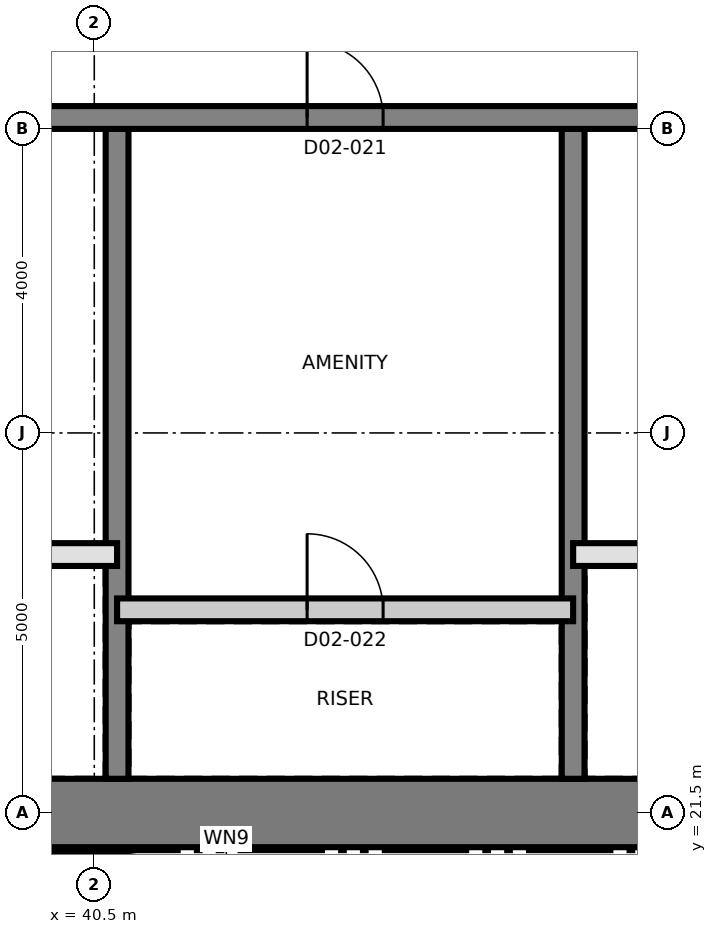
"""IFC4 building model, lengths in metres.
Left out: names, types, materials, properties, quantities, classifications, styles, units other than length and angle.
Written with IfcOpenShell. Run it as: python <this file> out.ifc"""

import sys

from ifc_helpers import new_model, si_unit, direction, frame, frame_2d, origin, place, context, subcontext, project, spatial, rectangle, extrude, element, fill, save


model = new_model("IFC4")
c1 = context("Model", 3, precision=1e-05, world=origin(), true_north=direction((0.0, 1.0)))
c2 = subcontext(c1, "Body", "Model", "MODEL_VIEW")
j1 = project(units=[si_unit("LENGTHUNIT", "METRE"), si_unit("PLANEANGLEUNIT", "RADIAN")], contexts=[c1])
p1 = place(None, origin())
s1 = spatial("IfcSite", under=j1, at=p1, CompositionType="ELEMENT")
p2 = place(p1, origin())
s2 = spatial("IfcBuilding", under=s1, at=p2, CompositionType="ELEMENT")
p3 = place(p2, frame((0.0, 0.0, 48.3)))
s3 = spatial("IfcBuildingStorey", under=s2, at=p3, CompositionType="ELEMENT", Elevation=48.3)
p4 = place(p3, frame((31.05, 21.5, 0.0), z_axis=(0.0, 0.0, 1.0), x_axis=(1.0, 0.0, 0.0)))
e1 = element("IfcWall", 1, at=p4, inside=s3, PredefinedType="SHEAR", context=c2, shape_type="SweptSolid", body=[
    extrude(rectangle(XDim=27.0, YDim=0.9, at=frame_2d((13.5, 0.0))), origin(), (0.0, 0.0, 1.0), 3.7),
])
for number, where, z_axis, x_axis in (
    (2, (40.8, 21.95, 0.0), (0.0, 0.0, 1.0), (0.0, 1.0, 0.0)),
    (3, (46.8, 21.95, 0.0), (0.0, 0.0, 1.0), (0.0, 1.0, 0.0)),
):
    element("IfcWall", number, at=place(p3, frame(where, z_axis=z_axis, x_axis=x_axis)), inside=s3, PredefinedType="SHEAR", context=c2, shape_type="SweptSolid", body=[
        extrude(rectangle(XDim=8.55, YDim=0.3, at=frame_2d((4.275, 0.0))), origin(), (0.0, 0.0, 1.0), 3.7),
    ])
p5 = place(p3, frame((31.95, 30.65, 0.0), z_axis=(0.0, 0.0, 1.0), x_axis=(1.0, 0.0, 0.0)))
e4 = element("IfcWall", 4, at=p5, inside=s3, PredefinedType="SHEAR", context=c2, shape_type="SweptSolid", body=[
    extrude(rectangle(XDim=26.1, YDim=0.3, at=frame_2d((13.05, 0.0))), origin(), (0.0, 0.0, 1.0), 3.7),
])
p6 = place(p5, frame((24.55, 0.0, 0.0)))
e5 = element("IfcOpeningElement", 5, at=p6, cuts=e4, PredefinedType="OPENING", context=c2, shape_type="SweptSolid", body=[
    extrude(rectangle(XDim=1.0, YDim=2.1, at=frame_2d((0.5, 1.05))), frame((0.0, 0.16, 0.0), z_axis=(0.0, -1.0, 0.0), x_axis=(1.0, 0.0, 0.0)), (0.0, 0.0, 1.0), 0.32),
])
p7 = place(p5, frame((11.35, 0.0, 0.0)))
e6 = element("IfcOpeningElement", 6, at=p7, cuts=e4, PredefinedType="OPENING", context=c2, shape_type="SweptSolid", body=[
    extrude(rectangle(XDim=1.0, YDim=2.1, at=frame_2d((0.5, 1.05))), frame((0.0, 0.16, 0.0), z_axis=(0.0, -1.0, 0.0), x_axis=(1.0, 0.0, 0.0)), (0.0, 0.0, 1.0), 0.32),
])
p8 = place(p3, frame((31.36, 20.85, 0.0), z_axis=(0.0, 0.0, 1.0), x_axis=(1.0, 0.0, 0.0)))
e7 = element("IfcWall", 7, at=p8, inside=s3, PredefinedType="SOLIDWALL", context=c2, shape_type="SweptSolid", body=[
    extrude(rectangle(XDim=9.094, YDim=0.3, at=frame_2d((4.547, 0.0))), origin(), (0.0, 0.0, 1.0), 3.4),
])
p9 = place(p3, frame((40.474, 20.849, 0.0), z_axis=(0.0, 0.0, 1.0), x_axis=(0.990778329255, -0.135492812649, 0.0)))
e8 = element("IfcWall", 8, at=p9, inside=s3, PredefinedType="SOLIDWALL", context=c2, shape_type="SweptSolid", body=[
    extrude(rectangle(XDim=3.559, YDim=0.3, at=frame_2d((1.779, 0.0))), origin(), (0.0, 0.0, 1.0), 3.4),
])
p10 = place(p9, frame((1.179, 0.0, 0.9)))
e9 = element("IfcOpeningElement", 9, at=p10, cuts=e8, PredefinedType="OPENING", context=c2, shape_type="SweptSolid", body=[
    extrude(rectangle(XDim=1.2, YDim=1.5, at=frame_2d((0.6, 0.75))), frame((0.0, 0.16, 0.0), z_axis=(0.0, -1.0, 0.0), x_axis=(1.0, 0.0, 0.0)), (0.0, 0.0, 1.0), 0.32),
])
p11 = place(p3, frame((40.8, 24.173, 0.0), z_axis=(0.0, 0.0, 1.0), x_axis=(1.0, 0.0, 0.0)))
e10 = element("IfcWall", 10, at=p11, inside=s3, PredefinedType="PARTITIONING", context=c2, shape_type="SweptSolid", body=[
    extrude(rectangle(XDim=6.0, YDim=0.3, at=frame_2d((3.0, 0.0))), origin(), (0.0, 0.0, 1.0), 3.4),
])
p12 = place(p11, frame((2.5, 0.0, 0.0)))
e11 = element("IfcOpeningElement", 11, at=p12, cuts=e10, PredefinedType="OPENING", context=c2, shape_type="SweptSolid", body=[
    extrude(rectangle(XDim=1.0, YDim=2.1, at=frame_2d((0.5, 1.05))), frame((0.0, 0.16, 0.0), z_axis=(0.0, -1.0, 0.0), x_axis=(1.0, 0.0, 0.0)), (0.0, 0.0, 1.0), 0.32),
])
p13 = place(p3, frame((31.8, 24.9, 0.0), z_axis=(0.0, 0.0, 1.0), x_axis=(1.0, 0.0, 0.0)))
e12 = element("IfcWall", 12, at=p13, inside=s3, PredefinedType="SOLIDWALL", context=c2, shape_type="SweptSolid", body=[
    extrude(rectangle(XDim=9.0, YDim=0.3, at=frame_2d((4.5, 0.0))), origin(), (0.0, 0.0, 1.0), 3.4),
])
p14 = place(p13, frame((7.05, 0.0, 0.0)))
e13 = element("IfcOpeningElement", 13, at=p14, cuts=e12, PredefinedType="OPENING", context=c2, shape_type="SweptSolid", body=[
    extrude(rectangle(XDim=0.9, YDim=2.1, at=frame_2d((0.45, 1.05))), frame((0.0, 0.16, 0.0), z_axis=(0.0, -1.0, 0.0), x_axis=(1.0, 0.0, 0.0)), (0.0, 0.0, 1.0), 0.32),
])
p15 = place(p13, frame((0.95, 0.0, 0.0)))
e14 = element("IfcOpeningElement", 14, at=p15, cuts=e12, PredefinedType="OPENING", context=c2, shape_type="SweptSolid", body=[
    extrude(rectangle(XDim=1.1, YDim=2.4, at=frame_2d((0.55, 1.2))), frame((0.0, 0.16, 0.0), z_axis=(0.0, -1.0, 0.0), x_axis=(1.0, 0.0, 0.0)), (0.0, 0.0, 1.0), 0.32),
])
p16 = place(p13, frame((3.95, 0.0, 0.0)))
e15 = element("IfcOpeningElement", 15, at=p16, cuts=e12, PredefinedType="OPENING", context=c2, shape_type="SweptSolid", body=[
    extrude(rectangle(XDim=1.1, YDim=2.4, at=frame_2d((0.55, 1.2))), frame((0.0, 0.16, 0.0), z_axis=(0.0, -1.0, 0.0), x_axis=(1.0, 0.0, 0.0)), (0.0, 0.0, 1.0), 0.32),
])
p17 = place(p3, frame((46.8, 24.9, 0.0), z_axis=(0.0, 0.0, 1.0), x_axis=(1.0, 0.0, 0.0)))
e16 = element("IfcWall", 16, at=p17, inside=s3, PredefinedType="SOLIDWALL", context=c2, shape_type="SweptSolid", body=[
    extrude(rectangle(XDim=9.0, YDim=0.3, at=frame_2d((4.5, 0.0))), origin(), (0.0, 0.0, 1.0), 3.4),
])
p18 = place(p17, frame((1.05, 0.0, 0.0)))
e17 = element("IfcOpeningElement", 17, at=p18, cuts=e16, PredefinedType="OPENING", context=c2, shape_type="SweptSolid", body=[
    extrude(rectangle(XDim=0.9, YDim=2.1, at=frame_2d((0.45, 1.05))), frame((0.0, 0.16, 0.0), z_axis=(0.0, -1.0, 0.0), x_axis=(1.0, 0.0, 0.0)), (0.0, 0.0, 1.0), 0.32),
])
p19 = place(p7, origin())
e18 = element("IfcDoor", 18, at=p19, inside=s3, OperationType="SINGLE_SWING_LEFT", PredefinedType="DOOR", context=c2, shape_type="SweptSolid", body=[
    extrude(rectangle(XDim=1.0, YDim=2.1, at=frame_2d((0.5, 1.05))), frame((0.0, 0.025, 0.0), z_axis=(0.0, -1.0, 0.0), x_axis=(1.0, 0.0, 0.0)), (0.0, 0.0, 1.0), 0.05),
])
fill(e6, e18)
p20 = place(p12, origin())
e19 = element("IfcDoor", 19, at=p20, inside=s3, OperationType="SINGLE_SWING_RIGHT", PredefinedType="DOOR", context=c2, shape_type="SweptSolid", body=[
    extrude(rectangle(XDim=1.0, YDim=2.1, at=frame_2d((0.5, 1.05))), frame((0.0, 0.025, 0.0), z_axis=(0.0, -1.0, 0.0), x_axis=(1.0, 0.0, 0.0)), (0.0, 0.0, 1.0), 0.05),
])
fill(e11, e19)
save(model, sys.argv[1])
